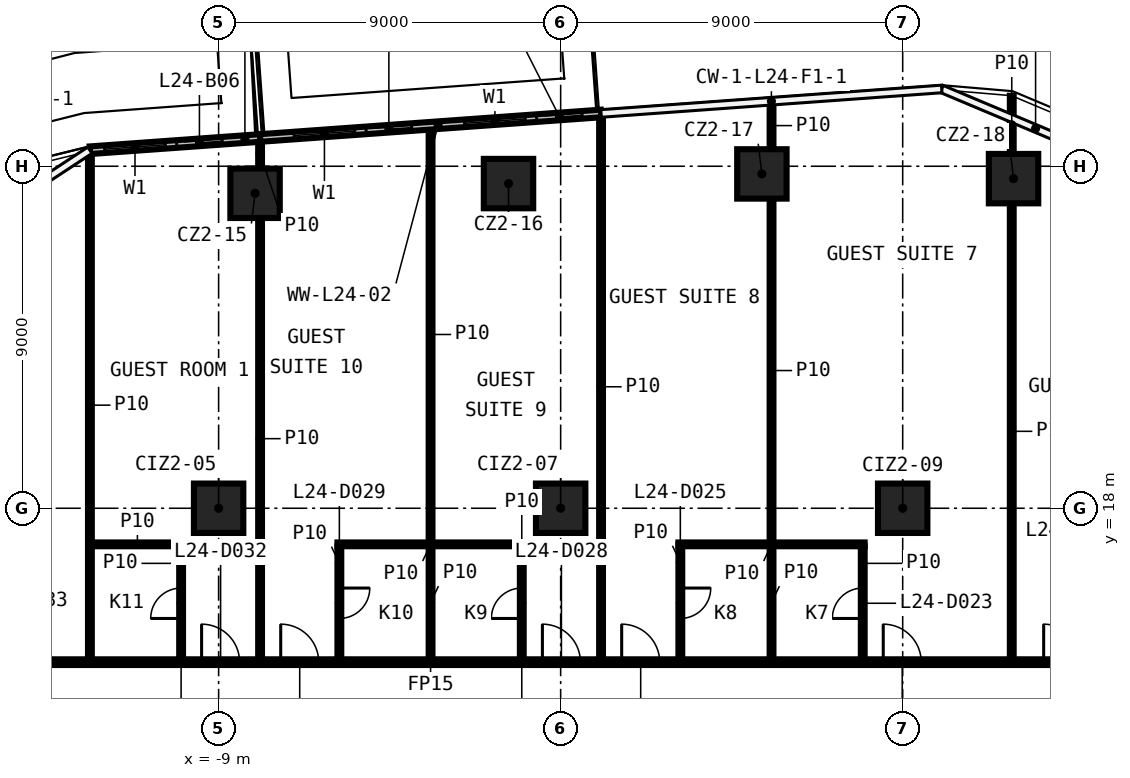
"""IFC4 building model, lengths in metres.
Left out: names, types, materials, properties, quantities, classifications, styles, units other than length and angle.
Written with IfcOpenShell. Run it as: python <this file> out.ifc"""

import sys

from ifc_helpers import new_model, si_unit, direction, frame, frame_2d, origin, origin_2d, place, context, subcontext, project, spatial, rectangle, extrude, element, fill, save


model = new_model("IFC4")
c1 = context("Model", 3, precision=1e-05, world=origin(), true_north=direction((0.0, 1.0)))
c2 = subcontext(c1, "Body", "Model", "MODEL_VIEW")
j1 = project(units=[si_unit("LENGTHUNIT", "METRE"), si_unit("PLANEANGLEUNIT", "RADIAN")], contexts=[c1])
p1 = place(None, origin())
s1 = spatial("IfcSite", under=j1, at=p1, CompositionType="ELEMENT")
p2 = place(p1, origin())
s2 = spatial("IfcBuilding", under=s1, at=p2, CompositionType="ELEMENT")
p3 = place(p2, frame((0.0, 0.0, 113.7)))
s3 = spatial("IfcBuildingStorey", under=s2, at=p3, CompositionType="ELEMENT", Elevation=113.7)
for number, where, z_axis, x_axis in (
    (1, (-8.041, 26.288, 0.0), (0.0, 0.0, 1.0), (1.0, 0.0, 0.0)),
    (2, (-1.372, 26.544, 0.0), (0.0, 0.0, 1.0), (1.0, 0.0, 0.0)),
    (3, (5.295, 26.798, 0.0), (0.0, 0.0, 1.0), (1.0, 0.0, 0.0)),
    (4, (11.917, 26.674, 0.0), (0.0, 0.0, 1.0), (1.0, 0.0, 0.0)),
    (5, (-9.0, 18.0, 0.0), (0.0, 0.0, 1.0), (1.0, 0.0, 0.0)),
    (6, (0.0, 18.0, 0.0), (0.0, 0.0, 1.0), (1.0, 0.0, 0.0)),
    (7, (9.0, 18.0, 0.0), (0.0, 0.0, 1.0), (1.0, 0.0, 0.0)),
):
    element("IfcColumn", number, at=place(p3, frame(where, z_axis=z_axis, x_axis=x_axis)), inside=s3, PredefinedType="COLUMN", context=c2, shape_type="SweptSolid", body=[
        extrude(rectangle(XDim=1.3, YDim=1.3, at=origin_2d()), origin(), (0.0, 0.0, 1.0), 3.3),
    ])
p4 = place(p3, frame((-17.025, 13.95, 0.0), z_axis=(0.0, 0.0, 1.0), x_axis=(1.0, 0.0, 0.0)))
e8 = element("IfcWall", 8, at=p4, inside=s3, PredefinedType="PARTITIONING", context=c2, shape_type="SweptSolid", body=[
    extrude(rectangle(XDim=34.05, YDim=0.15, at=frame_2d((17.025, 0.0))), origin(), (0.0, 0.0, 1.0), 3.3),
])
p5 = place(p4, frame((29.735, 0.0, 0.0)))
e9 = element("IfcOpeningElement", 9, at=p5, cuts=e8, PredefinedType="OPENING", context=c2, shape_type="SweptSolid", body=[
    extrude(rectangle(XDim=1.0, YDim=2.1, at=frame_2d((0.5, 1.05))), frame((0.0, 0.085, 0.0), z_axis=(0.0, -1.0, 0.0), x_axis=(1.0, 0.0, 0.0)), (0.0, 0.0, 1.0), 0.17),
])
p6 = place(p4, frame((25.513, 0.0, 0.0)))
e10 = element("IfcOpeningElement", 10, at=p6, cuts=e8, PredefinedType="OPENING", context=c2, shape_type="SweptSolid", body=[
    extrude(rectangle(XDim=1.0, YDim=2.1, at=frame_2d((0.5, 1.05))), frame((0.0, 0.085, 0.0), z_axis=(0.0, -1.0, 0.0), x_axis=(1.0, 0.0, 0.0)), (0.0, 0.0, 1.0), 0.17),
])
p7 = place(p4, frame((18.631, 0.0, 0.0)))
e11 = element("IfcOpeningElement", 11, at=p7, cuts=e8, PredefinedType="OPENING", context=c2, shape_type="SweptSolid", body=[
    extrude(rectangle(XDim=1.0, YDim=2.1, at=frame_2d((0.5, 1.05))), frame((0.0, 0.085, 0.0), z_axis=(0.0, -1.0, 0.0), x_axis=(1.0, 0.0, 0.0)), (0.0, 0.0, 1.0), 0.17),
])
p8 = place(p4, frame((16.545, 0.0, 0.0)))
e12 = element("IfcOpeningElement", 12, at=p8, cuts=e8, PredefinedType="OPENING", context=c2, shape_type="SweptSolid", body=[
    extrude(rectangle(XDim=1.0, YDim=2.1, at=frame_2d((0.5, 1.05))), frame((0.0, 0.085, 0.0), z_axis=(0.0, -1.0, 0.0), x_axis=(1.0, 0.0, 0.0)), (0.0, 0.0, 1.0), 0.17),
])
p9 = place(p4, frame((9.659, 0.0, 0.0)))
e13 = element("IfcOpeningElement", 13, at=p9, cuts=e8, PredefinedType="OPENING", context=c2, shape_type="SweptSolid", body=[
    extrude(rectangle(XDim=1.0, YDim=2.1, at=frame_2d((0.5, 1.05))), frame((0.0, 0.085, 0.0), z_axis=(0.0, -1.0, 0.0), x_axis=(1.0, 0.0, 0.0)), (0.0, 0.0, 1.0), 0.17),
])
p10 = place(p4, frame((7.577, 0.0, 0.0)))
e14 = element("IfcOpeningElement", 14, at=p10, cuts=e8, PredefinedType="OPENING", context=c2, shape_type="SweptSolid", body=[
    extrude(rectangle(XDim=1.0, YDim=2.1, at=frame_2d((0.5, 1.05))), frame((0.0, 0.085, 0.0), z_axis=(0.0, -1.0, 0.0), x_axis=(1.0, 0.0, 0.0)), (0.0, 0.0, 1.0), 0.17),
])
p11 = place(p4, frame((2.381, 0.0, 0.0)))
e15 = element("IfcOpeningElement", 15, at=p11, cuts=e8, PredefinedType="OPENING", context=c2, shape_type="SweptSolid", body=[
    extrude(rectangle(XDim=0.9, YDim=2.1, at=frame_2d((0.45, 1.05))), frame((0.0, 0.085, 0.0), z_axis=(0.0, -1.0, 0.0), x_axis=(1.0, 0.0, 0.0)), (0.0, 0.0, 1.0), 0.17),
])
p12 = place(p3, frame((-12.337, 17.05, 0.0), z_axis=(0.0, 0.0, 1.0), x_axis=(1.0, 0.0, 0.0)))
e16 = element("IfcWall", 16, at=p12, inside=s3, PredefinedType="PARTITIONING", context=c2, shape_type="SweptSolid", body=[
    extrude(rectangle(XDim=2.4, YDim=0.1, at=frame_2d((1.2, 0.0))), origin(), (0.0, 0.0, 1.0), 3.3),
])
for number, where, z_axis, x_axis in (
    (17, (-5.873, 17.05, 0.0), (0.0, 0.0, 1.0), (1.0, 0.0, 0.0)),
    (18, (3.099, 17.05, 0.0), (0.0, 0.0, 1.0), (1.0, 0.0, 0.0)),
):
    element("IfcWall", number, at=place(p3, frame(where, z_axis=z_axis, x_axis=x_axis)), inside=s3, PredefinedType="PARTITIONING", context=c2, shape_type="SweptSolid", body=[
        extrude(rectangle(XDim=4.9, YDim=0.1, at=frame_2d((2.45, 0.0))), origin(), (0.0, 0.0, 1.0), 3.3),
    ])
p13 = place(p3, frame((11.87, 14.025, 0.0), z_axis=(0.0, 0.0, 1.0), x_axis=(0.0, 1.0, 0.0)))
e19 = element("IfcWall", 19, at=p13, inside=s3, PredefinedType="PARTITIONING", context=c2, shape_type="SweptSolid", body=[
    extrude(rectangle(XDim=11.999, YDim=0.1, at=frame_2d((6.0, 0.0))), origin(), (0.0, 0.0, 1.0), 3.3),
])
p14 = place(p3, frame((11.87, 27.324, 0.0), z_axis=(0.0, 0.0, 1.0), x_axis=(0.0, 1.0, 0.0)))
e20 = element("IfcWall", 20, at=p14, inside=s3, PredefinedType="PARTITIONING", context=c2, shape_type="SweptSolid", body=[
    extrude(rectangle(XDim=1.531, YDim=0.1, at=frame_2d((0.766, 0.0))), origin(), (0.0, 0.0, 1.0), 3.3),
])
p15 = place(p3, frame((7.949, 14.025, 0.0), z_axis=(0.0, 0.0, 1.0), x_axis=(0.0, 1.0, 0.0)))
e21 = element("IfcWall", 21, at=p15, inside=s3, PredefinedType="PARTITIONING", context=c2, shape_type="SweptSolid", body=[
    extrude(rectangle(XDim=2.975, YDim=0.1, at=frame_2d((1.488, 0.0))), origin(), (0.0, 0.0, 1.0), 3.3),
])
p16 = place(p15, frame((1.075, 0.0, 0.0)))
e22 = element("IfcOpeningElement", 22, at=p16, cuts=e21, PredefinedType="OPENING", context=c2, shape_type="SweptSolid", body=[
    extrude(rectangle(XDim=0.8, YDim=2.1, at=frame_2d((0.4, 1.05))), frame((0.0, 0.06, 0.0), z_axis=(0.0, -1.0, 0.0), x_axis=(1.0, 0.0, 0.0)), (0.0, 0.0, 1.0), 0.12),
])
p17 = place(p3, frame((5.549, 14.025, 0.0), z_axis=(0.0, 0.0, 1.0), x_axis=(0.0, 1.0, 0.0)))
e23 = element("IfcWall", 23, at=p17, inside=s3, PredefinedType="PARTITIONING", context=c2, shape_type="SweptSolid", body=[
    extrude(rectangle(XDim=2.975, YDim=0.1, at=frame_2d((1.488, 0.0))), origin(), (0.0, 0.0, 1.0), 3.3),
])
p18 = place(p3, frame((5.549, 17.1, 0.0), z_axis=(0.0, 0.0, 1.0), x_axis=(0.0, 1.0, 0.0)))
e24 = element("IfcWall", 24, at=p18, inside=s3, PredefinedType="PARTITIONING", context=c2, shape_type="SweptSolid", body=[
    extrude(rectangle(XDim=9.048, YDim=0.1, at=frame_2d((4.524, 0.0))), origin(), (0.0, 0.0, 1.0), 3.3),
])
p19 = place(p3, frame((5.549, 27.448, 0.0), z_axis=(0.0, 0.0, 1.0), x_axis=(0.0, 1.0, 0.0)))
e25 = element("IfcWall", 25, at=p19, inside=s3, PredefinedType="PARTITIONING", context=c2, shape_type="SweptSolid", body=[
    extrude(rectangle(XDim=1.243, YDim=0.1, at=frame_2d((0.622, 0.0))), origin(), (0.0, 0.0, 1.0), 3.3),
])
p20 = place(p3, frame((3.149, 17.05, 0.0), z_axis=(0.0, 0.0, 1.0), x_axis=(0.0, -1.0, 0.0)))
e26 = element("IfcWall", 26, at=p20, inside=s3, PredefinedType="PARTITIONING", context=c2, shape_type="SweptSolid", body=[
    extrude(rectangle(XDim=3.025, YDim=0.1, at=frame_2d((1.513, 0.0))), origin(), (0.0, 0.0, 1.0), 3.3),
])
p21 = place(p20, frame((1.15, 0.0, 0.0)))
e27 = element("IfcOpeningElement", 27, at=p21, cuts=e26, PredefinedType="OPENING", context=c2, shape_type="SweptSolid", body=[
    extrude(rectangle(XDim=0.8, YDim=2.1, at=frame_2d((0.4, 1.05))), frame((0.0, 0.06, 0.0), z_axis=(0.0, -1.0, 0.0), x_axis=(1.0, 0.0, 0.0)), (0.0, 0.0, 1.0), 0.12),
])
p22 = place(p3, frame((1.063, 14.025, 0.0), z_axis=(0.0, 0.0, 1.0), x_axis=(0.0, 1.0, 0.0)))
e28 = element("IfcWall", 28, at=p22, inside=s3, PredefinedType="PARTITIONING", context=c2, shape_type="SweptSolid", body=[
    extrude(rectangle(XDim=14.344, YDim=0.1, at=frame_2d((7.172, 0.0))), origin(), (0.0, 0.0, 1.0), 3.3),
])
p23 = place(p3, frame((-1.023, 14.025, 0.0), z_axis=(0.0, 0.0, 1.0), x_axis=(0.0, 1.0, 0.0)))
e29 = element("IfcWall", 29, at=p23, inside=s3, PredefinedType="PARTITIONING", context=c2, shape_type="SweptSolid", body=[
    extrude(rectangle(XDim=3.025, YDim=0.1, at=frame_2d((1.513, 0.0))), origin(), (0.0, 0.0, 1.0), 3.3),
])
p24 = place(p23, frame((1.075, 0.0, 0.0)))
e30 = element("IfcOpeningElement", 30, at=p24, cuts=e29, PredefinedType="OPENING", context=c2, shape_type="SweptSolid", body=[
    extrude(rectangle(XDim=0.8, YDim=2.1, at=frame_2d((0.4, 1.05))), frame((0.0, 0.06, 0.0), z_axis=(0.0, -1.0, 0.0), x_axis=(1.0, 0.0, 0.0)), (0.0, 0.0, 1.0), 0.12),
])
p25 = place(p3, frame((-3.423, 14.025, 0.0), z_axis=(0.0, 0.0, 1.0), x_axis=(0.0, 1.0, 0.0)))
e31 = element("IfcWall", 31, at=p25, inside=s3, PredefinedType="PARTITIONING", context=c2, shape_type="SweptSolid", body=[
    extrude(rectangle(XDim=2.975, YDim=0.1, at=frame_2d((1.488, 0.0))), origin(), (0.0, 0.0, 1.0), 3.3),
])
p26 = place(p3, frame((-3.423, 17.1, 0.0), z_axis=(0.0, 0.0, 1.0), x_axis=(0.0, 1.0, 0.0)))
e32 = element("IfcWall", 32, at=p26, inside=s3, PredefinedType="PARTITIONING", context=c2, shape_type="SweptSolid", body=[
    extrude(rectangle(XDim=10.946, YDim=0.1, at=frame_2d((5.473, 0.0))), origin(), (0.0, 0.0, 1.0), 3.3),
])
p27 = place(p3, frame((-5.823, 17.0, 0.0), z_axis=(0.0, 0.0, 1.0), x_axis=(0.0, -1.0, 0.0)))
e33 = element("IfcWall", 33, at=p27, inside=s3, PredefinedType="PARTITIONING", context=c2, shape_type="SweptSolid", body=[
    extrude(rectangle(XDim=2.975, YDim=0.1, at=frame_2d((1.488, 0.0))), origin(), (0.0, 0.0, 1.0), 3.3),
])
p28 = place(p27, frame((1.1, 0.0, 0.0)))
e34 = element("IfcOpeningElement", 34, at=p28, cuts=e33, PredefinedType="OPENING", context=c2, shape_type="SweptSolid", body=[
    extrude(rectangle(XDim=0.8, YDim=2.1, at=frame_2d((0.4, 1.05))), frame((0.0, 0.06, 0.0), z_axis=(0.0, -1.0, 0.0), x_axis=(1.0, 0.0, 0.0)), (0.0, 0.0, 1.0), 0.12),
])
p29 = place(p3, frame((-7.909, 14.025, 0.0), z_axis=(0.0, 0.0, 1.0), x_axis=(0.0, 1.0, 0.0)))
e35 = element("IfcWall", 35, at=p29, inside=s3, PredefinedType="PARTITIONING", context=c2, shape_type="SweptSolid", body=[
    extrude(rectangle(XDim=11.613, YDim=0.1, at=frame_2d((5.807, 0.0))), origin(), (0.0, 0.0, 1.0), 3.3),
])
p30 = place(p3, frame((-7.909, 26.938, 0.0), z_axis=(0.0, 0.0, 1.0), x_axis=(0.0, 1.0, 0.0)))
e36 = element("IfcWall", 36, at=p30, inside=s3, PredefinedType="PARTITIONING", context=c2, shape_type="SweptSolid", body=[
    extrude(rectangle(XDim=0.785, YDim=0.1, at=frame_2d((0.393, 0.0))), origin(), (0.0, 0.0, 1.0), 3.3),
])
p31 = place(p3, frame((-9.987, 14.025, 0.0), z_axis=(0.0, 0.0, 1.0), x_axis=(0.0, 1.0, 0.0)))
e37 = element("IfcWall", 37, at=p31, inside=s3, PredefinedType="PARTITIONING", context=c2, shape_type="SweptSolid", body=[
    extrude(rectangle(XDim=2.975, YDim=0.1, at=frame_2d((1.488, 0.0))), origin(), (0.0, 0.0, 1.0), 3.3),
])
p32 = place(p31, frame((1.075, 0.0, 0.0)))
e38 = element("IfcOpeningElement", 38, at=p32, cuts=e37, PredefinedType="OPENING", context=c2, shape_type="SweptSolid", body=[
    extrude(rectangle(XDim=0.8, YDim=2.1, at=frame_2d((0.4, 1.05))), frame((0.0, 0.06, 0.0), z_axis=(0.0, -1.0, 0.0), x_axis=(1.0, 0.0, 0.0)), (0.0, 0.0, 1.0), 0.12),
])
p33 = place(p3, frame((-12.387, 14.025, 0.0), z_axis=(0.0, 0.0, 1.0), x_axis=(0.0, 1.0, 0.0)))
e39 = element("IfcWall", 39, at=p33, inside=s3, PredefinedType="PARTITIONING", context=c2, shape_type="SweptSolid", body=[
    extrude(rectangle(XDim=13.376, YDim=0.1, at=frame_2d((6.688, 0.0))), origin(), (0.0, 0.0, 1.0), 3.3),
])
p34 = place(p3, frame((1.063, 28.389, 0.0), z_axis=(0.0, 0.0, 1.0), x_axis=(-0.997421921005, -0.071760096847, 0.0)))
e40 = element("IfcWall", 40, at=p34, inside=s3, PredefinedType="SOLIDWALL", context=c2, shape_type="SweptSolid", body=[
    extrude(rectangle(XDim=8.995, YDim=0.2, at=frame_2d((4.498, 0.0))), origin(), (0.0, 0.0, 1.0), 3.3),
])
p35 = place(p34, frame((2.0, 0.0, 0.6)))
e41 = element("IfcOpeningElement", 41, at=p35, cuts=e40, PredefinedType="OPENING", context=c2, shape_type="SweptSolid", body=[
    extrude(rectangle(XDim=1.6, YDim=2.4, at=frame_2d((0.8, 1.2))), frame((0.0, 0.11, 0.0), z_axis=(0.0, -1.0, 0.0), x_axis=(1.0, 0.0, 0.0)), (0.0, 0.0, 1.0), 0.22),
])
p36 = place(p34, frame((0.5, 0.0, 0.0)))
e42 = element("IfcOpeningElement", 42, at=p36, cuts=e40, PredefinedType="OPENING", context=c2, shape_type="SweptSolid", body=[
    extrude(rectangle(XDim=1.2, YDim=2.4, at=frame_2d((0.6, 1.2))), frame((0.0, 0.11, 0.0), z_axis=(0.0, -1.0, 0.0), x_axis=(1.0, 0.0, 0.0)), (0.0, 0.0, 1.0), 0.22),
])
p37 = place(p34, frame((6.498, 0.0, 0.6)))
e43 = element("IfcOpeningElement", 43, at=p37, cuts=e40, PredefinedType="OPENING", context=c2, shape_type="SweptSolid", body=[
    extrude(rectangle(XDim=1.6, YDim=2.4, at=frame_2d((0.8, 1.2))), frame((0.0, 0.11, 0.0), z_axis=(0.0, -1.0, 0.0), x_axis=(1.0, 0.0, 0.0)), (0.0, 0.0, 1.0), 0.22),
])
p38 = place(p34, frame((4.998, 0.0, 0.0)))
e44 = element("IfcOpeningElement", 44, at=p38, cuts=e40, PredefinedType="OPENING", context=c2, shape_type="SweptSolid", body=[
    extrude(rectangle(XDim=1.2, YDim=2.4, at=frame_2d((0.6, 1.2))), frame((0.0, 0.11, 0.0), z_axis=(0.0, -1.0, 0.0), x_axis=(1.0, 0.0, 0.0)), (0.0, 0.0, 1.0), 0.22),
])
p39 = place(p3, frame((-7.909, 27.743, 0.0), z_axis=(0.0, 0.0, 1.0), x_axis=(-0.997423796537, -0.071734023317, 0.0)))
e45 = element("IfcWall", 45, at=p39, inside=s3, PredefinedType="SOLIDWALL", context=c2, shape_type="SweptSolid", body=[
    extrude(rectangle(XDim=4.489, YDim=0.2, at=frame_2d((2.245, 0.0))), origin(), (0.0, 0.0, 1.0), 3.3),
])
p40 = place(p39, frame((2.5, 0.0, 0.6)))
e46 = element("IfcOpeningElement", 46, at=p40, cuts=e45, PredefinedType="OPENING", context=c2, shape_type="SweptSolid", body=[
    extrude(rectangle(XDim=1.6, YDim=2.4, at=frame_2d((0.8, 1.2))), frame((0.0, 0.11, 0.0), z_axis=(0.0, -1.0, 0.0), x_axis=(1.0, 0.0, 0.0)), (0.0, 0.0, 1.0), 0.22),
])
p41 = place(p39, frame((1.0, 0.0, 0.0)))
e47 = element("IfcOpeningElement", 47, at=p41, cuts=e45, PredefinedType="OPENING", context=c2, shape_type="SweptSolid", body=[
    extrude(rectangle(XDim=1.2, YDim=2.4, at=frame_2d((0.6, 1.2))), frame((0.0, 0.11, 0.0), z_axis=(0.0, -1.0, 0.0), x_axis=(1.0, 0.0, 0.0)), (0.0, 0.0, 1.0), 0.22),
])
p42 = place(p5, origin())
e48 = element("IfcDoor", 48, at=p42, inside=s3, OperationType="SINGLE_SWING_RIGHT", PredefinedType="DOOR", context=c2, shape_type="SweptSolid", body=[
    extrude(rectangle(XDim=1.0, YDim=2.1, at=frame_2d((0.5, 1.05))), frame((0.0, 0.025, 0.0), z_axis=(0.0, -1.0, 0.0), x_axis=(1.0, 0.0, 0.0)), (0.0, 0.0, 1.0), 0.05),
])
fill(e9, e48)
p43 = place(p16, origin())
e49 = element("IfcDoor", 49, at=p43, inside=s3, OperationType="SINGLE_SWING_RIGHT", PredefinedType="DOOR", context=c2, shape_type="SweptSolid", body=[
    extrude(rectangle(XDim=0.8, YDim=2.1, at=frame_2d((0.4, 1.05))), frame((0.0, 0.025, 0.0), z_axis=(0.0, -1.0, 0.0), x_axis=(1.0, 0.0, 0.0)), (0.0, 0.0, 1.0), 0.05),
])
fill(e22, e49)
p44 = place(p6, origin())
e50 = element("IfcDoor", 50, at=p44, inside=s3, OperationType="SINGLE_SWING_LEFT", PredefinedType="DOOR", context=c2, shape_type="SweptSolid", body=[
    extrude(rectangle(XDim=1.0, YDim=2.1, at=frame_2d((0.5, 1.05))), frame((0.0, 0.025, 0.0), z_axis=(0.0, -1.0, 0.0), x_axis=(1.0, 0.0, 0.0)), (0.0, 0.0, 1.0), 0.05),
])
fill(e10, e50)
p45 = place(p21, origin())
e51 = element("IfcDoor", 51, at=p45, inside=s3, OperationType="SINGLE_SWING_LEFT", PredefinedType="DOOR", context=c2, shape_type="SweptSolid", body=[
    extrude(rectangle(XDim=0.8, YDim=2.1, at=frame_2d((0.4, 1.05))), frame((0.0, 0.025, 0.0), z_axis=(0.0, -1.0, 0.0), x_axis=(1.0, 0.0, 0.0)), (0.0, 0.0, 1.0), 0.05),
])
fill(e27, e51)
p46 = place(p7, origin())
e52 = element("IfcDoor", 52, at=p46, inside=s3, OperationType="SINGLE_SWING_RIGHT", PredefinedType="DOOR", context=c2, shape_type="SweptSolid", body=[
    extrude(rectangle(XDim=1.0, YDim=2.1, at=frame_2d((0.5, 1.05))), frame((0.0, 0.025, 0.0), z_axis=(0.0, -1.0, 0.0), x_axis=(1.0, 0.0, 0.0)), (0.0, 0.0, 1.0), 0.05),
])
fill(e11, e52)
p47 = place(p24, origin())
e53 = element("IfcDoor", 53, at=p47, inside=s3, OperationType="SINGLE_SWING_RIGHT", PredefinedType="DOOR", context=c2, shape_type="SweptSolid", body=[
    extrude(rectangle(XDim=0.8, YDim=2.1, at=frame_2d((0.4, 1.05))), frame((0.0, 0.025, 0.0), z_axis=(0.0, -1.0, 0.0), x_axis=(1.0, 0.0, 0.0)), (0.0, 0.0, 1.0), 0.05),
])
fill(e30, e53)
p48 = place(p8, origin())
e54 = element("IfcDoor", 54, at=p48, inside=s3, OperationType="SINGLE_SWING_LEFT", PredefinedType="DOOR", context=c2, shape_type="SweptSolid", body=[
    extrude(rectangle(XDim=1.0, YDim=2.1, at=frame_2d((0.5, 1.05))), frame((0.0, 0.025, 0.0), z_axis=(0.0, -1.0, 0.0), x_axis=(1.0, 0.0, 0.0)), (0.0, 0.0, 1.0), 0.05),
])
fill(e12, e54)
p49 = place(p28, origin())
e55 = element("IfcDoor", 55, at=p49, inside=s3, OperationType="SINGLE_SWING_LEFT", PredefinedType="DOOR", context=c2, shape_type="SweptSolid", body=[
    extrude(rectangle(XDim=0.8, YDim=2.1, at=frame_2d((0.4, 1.05))), frame((0.0, 0.025, 0.0), z_axis=(0.0, -1.0, 0.0), x_axis=(1.0, 0.0, 0.0)), (0.0, 0.0, 1.0), 0.05),
])
fill(e34, e55)
p50 = place(p9, origin())
e56 = element("IfcDoor", 56, at=p50, inside=s3, OperationType="SINGLE_SWING_RIGHT", PredefinedType="DOOR", context=c2, shape_type="SweptSolid", body=[
    extrude(rectangle(XDim=1.0, YDim=2.1, at=frame_2d((0.5, 1.05))), frame((0.0, 0.025, 0.0), z_axis=(0.0, -1.0, 0.0), x_axis=(1.0, 0.0, 0.0)), (0.0, 0.0, 1.0), 0.05),
])
fill(e13, e56)
p51 = place(p32, origin())
e57 = element("IfcDoor", 57, at=p51, inside=s3, OperationType="SINGLE_SWING_RIGHT", PredefinedType="DOOR", context=c2, shape_type="SweptSolid", body=[
    extrude(rectangle(XDim=0.8, YDim=2.1, at=frame_2d((0.4, 1.05))), frame((0.0, 0.025, 0.0), z_axis=(0.0, -1.0, 0.0), x_axis=(1.0, 0.0, 0.0)), (0.0, 0.0, 1.0), 0.05),
])
fill(e38, e57)
p52 = place(p10, origin())
e58 = element("IfcDoor", 58, at=p52, inside=s3, OperationType="SINGLE_SWING_LEFT", PredefinedType="DOOR", context=c2, shape_type="SweptSolid", body=[
    extrude(rectangle(XDim=1.0, YDim=2.1, at=frame_2d((0.5, 1.05))), frame((0.0, 0.025, 0.0), z_axis=(0.0, -1.0, 0.0), x_axis=(1.0, 0.0, 0.0)), (0.0, 0.0, 1.0), 0.05),
])
fill(e14, e58)
p53 = place(p35, origin())
e59 = element("IfcWindow", 59, at=p53, inside=s3, PartitioningType="SINGLE_PANEL", PredefinedType="WINDOW", context=c2, shape_type="SweptSolid", body=[
    extrude(rectangle(XDim=1.6, YDim=2.4, at=frame_2d((0.8, 1.2))), frame((0.0, 0.03, 0.0), z_axis=(0.0, -1.0, 0.0), x_axis=(1.0, 0.0, 0.0)), (0.0, 0.0, 1.0), 0.06),
])
fill(e41, e59)
p54 = place(p36, origin())
e60 = element("IfcDoor", 60, at=p54, inside=s3, OperationType="SLIDING_TO_LEFT", PredefinedType="DOOR", context=c2, shape_type="SweptSolid", body=[
    extrude(rectangle(XDim=1.2, YDim=2.4, at=frame_2d((0.6, 1.2))), frame((0.0, 0.025, 0.0), z_axis=(0.0, -1.0, 0.0), x_axis=(1.0, 0.0, 0.0)), (0.0, 0.0, 1.0), 0.05),
])
fill(e42, e60)
p55 = place(p37, origin())
e61 = element("IfcWindow", 61, at=p55, inside=s3, PartitioningType="SINGLE_PANEL", PredefinedType="WINDOW", context=c2, shape_type="SweptSolid", body=[
    extrude(rectangle(XDim=1.6, YDim=2.4, at=frame_2d((0.8, 1.2))), frame((0.0, 0.03, 0.0), z_axis=(0.0, -1.0, 0.0), x_axis=(1.0, 0.0, 0.0)), (0.0, 0.0, 1.0), 0.06),
])
fill(e43, e61)
p56 = place(p38, origin())
e62 = element("IfcDoor", 62, at=p56, inside=s3, OperationType="SLIDING_TO_LEFT", PredefinedType="DOOR", context=c2, shape_type="SweptSolid", body=[
    extrude(rectangle(XDim=1.2, YDim=2.4, at=frame_2d((0.6, 1.2))), frame((0.0, 0.025, 0.0), z_axis=(0.0, -1.0, 0.0), x_axis=(1.0, 0.0, 0.0)), (0.0, 0.0, 1.0), 0.05),
])
fill(e44, e62)
p57 = place(p40, origin())
e63 = element("IfcWindow", 63, at=p57, inside=s3, PartitioningType="SINGLE_PANEL", PredefinedType="WINDOW", context=c2, shape_type="SweptSolid", body=[
    extrude(rectangle(XDim=1.6, YDim=2.4, at=frame_2d((0.8, 1.2))), frame((0.0, 0.03, 0.0), z_axis=(0.0, -1.0, 0.0), x_axis=(1.0, 0.0, 0.0)), (0.0, 0.0, 1.0), 0.06),
])
fill(e46, e63)
p58 = place(p41, origin())
e64 = element("IfcDoor", 64, at=p58, inside=s3, OperationType="SLIDING_TO_LEFT", PredefinedType="DOOR", context=c2, shape_type="SweptSolid", body=[
    extrude(rectangle(XDim=1.2, YDim=2.4, at=frame_2d((0.6, 1.2))), frame((0.0, 0.025, 0.0), z_axis=(0.0, -1.0, 0.0), x_axis=(1.0, 0.0, 0.0)), (0.0, 0.0, 1.0), 0.05),
])
fill(e47, e64)
save(model, sys.argv[1])
